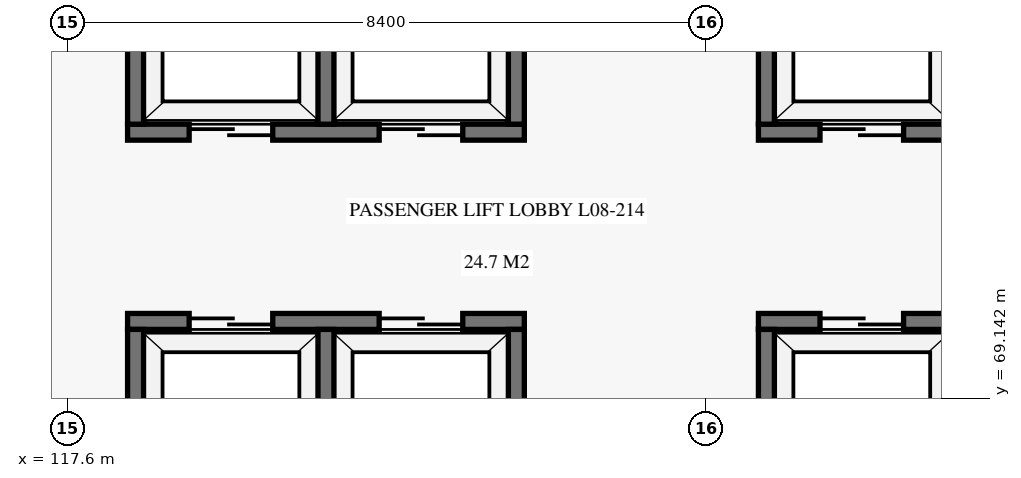
"""IFC4 building model, lengths in metres.
Left out: names, types, materials, properties, quantities, classifications, styles, units other than length and angle.
Written with IfcOpenShell. Run it as: python <this file> out.ifc"""

import sys

from ifc_helpers import new_model, si_unit, direction, frame, frame_2d, origin, place, context, subcontext, project, spatial, rectangle, extrude, element, fill, save


model = new_model("IFC4")
c1 = context("Model", 3, precision=1e-05, world=origin(), true_north=direction((0.0, 1.0)))
c2 = subcontext(c1, "Body", "Model", "MODEL_VIEW")
j1 = project(units=[si_unit("LENGTHUNIT", "METRE"), si_unit("PLANEANGLEUNIT", "RADIAN")], contexts=[c1])
p1 = place(None, origin())
s1 = spatial("IfcSite", under=j1, at=p1, CompositionType="ELEMENT")
p2 = place(p1, origin())
s2 = spatial("IfcBuilding", under=s1, at=p2, CompositionType="ELEMENT")
p3 = place(p2, frame((0.0, 0.0, 34.7)))
s3 = spatial("IfcBuildingStorey", under=s2, at=p3, CompositionType="ELEMENT", Elevation=34.7)
p4 = place(p3, frame((126.69, 70.155, 0.0), z_axis=(0.0, 0.0, 1.0), x_axis=(1.0, 0.0, 0.0)))
e1 = element("IfcWall", 1, at=p4, inside=s3, PredefinedType="SHEAR", context=c2, shape_type="SweptSolid", body=[
    extrude(rectangle(XDim=5.22, YDim=0.21, at=frame_2d((2.61, 0.0))), origin(), (0.0, 0.0, 1.0), 3.72),
])
p5 = place(p4, frame((0.81, 0.0, 0.0)))
e2 = element("IfcOpeningElement", 2, at=p5, cuts=e1, PredefinedType="OPENING", context=c2, shape_type="SweptSolid", body=[
    extrude(rectangle(XDim=1.1, YDim=2.15, at=frame_2d((0.55, 1.075))), frame((0.0, 0.115, 0.0), z_axis=(0.0, -1.0, 0.0), x_axis=(1.0, 0.0, 0.0)), (0.0, 0.0, 1.0), 0.23),
])
p6 = place(p4, frame((3.31, 0.0, 0.0)))
e3 = element("IfcOpeningElement", 3, at=p6, cuts=e1, PredefinedType="OPENING", context=c2, shape_type="SweptSolid", body=[
    extrude(rectangle(XDim=1.1, YDim=2.15, at=frame_2d((0.55, 1.075))), frame((0.0, 0.115, 0.0), z_axis=(0.0, -1.0, 0.0), x_axis=(1.0, 0.0, 0.0)), (0.0, 0.0, 1.0), 0.23),
])
p7 = place(p3, frame((126.795, 67.85, 0.0), z_axis=(0.0, 0.0, 1.0), x_axis=(0.0, 1.0, 0.0)))
e4 = element("IfcWall", 4, at=p7, inside=s3, PredefinedType="SHEAR", context=c2, shape_type="SweptSolid", body=[
    extrude(rectangle(XDim=2.2, YDim=0.21, at=frame_2d((1.1, 0.0))), origin(), (0.0, 0.0, 1.0), 3.72),
])
p8 = place(p3, frame((126.69, 72.645, 0.0), z_axis=(0.0, 0.0, 1.0), x_axis=(1.0, 0.0, 0.0)))
e5 = element("IfcWall", 5, at=p8, inside=s3, PredefinedType="SHEAR", context=c2, shape_type="SweptSolid", body=[
    extrude(rectangle(XDim=5.22, YDim=0.21, at=frame_2d((2.61, 0.0))), origin(), (0.0, 0.0, 1.0), 3.72),
])
p9 = place(p8, frame((0.81, 0.0, 0.0)))
e6 = element("IfcOpeningElement", 6, at=p9, cuts=e5, PredefinedType="OPENING", context=c2, shape_type="SweptSolid", body=[
    extrude(rectangle(XDim=1.1, YDim=2.15, at=frame_2d((0.55, 1.075))), frame((0.0, 0.115, 0.0), z_axis=(0.0, -1.0, 0.0), x_axis=(1.0, 0.0, 0.0)), (0.0, 0.0, 1.0), 0.23),
])
p10 = place(p8, frame((3.31, 0.0, 0.0)))
e7 = element("IfcOpeningElement", 7, at=p10, cuts=e5, PredefinedType="OPENING", context=c2, shape_type="SweptSolid", body=[
    extrude(rectangle(XDim=1.1, YDim=2.15, at=frame_2d((0.55, 1.075))), frame((0.0, 0.115, 0.0), z_axis=(0.0, -1.0, 0.0), x_axis=(1.0, 0.0, 0.0)), (0.0, 0.0, 1.0), 0.23),
])
p11 = place(p3, frame((126.795, 72.75, 0.0), z_axis=(0.0, 0.0, 1.0), x_axis=(0.0, 1.0, 0.0)))
e8 = element("IfcWall", 8, at=p11, inside=s3, PredefinedType="SHEAR", context=c2, shape_type="SweptSolid", body=[
    extrude(rectangle(XDim=2.2, YDim=0.21, at=frame_2d((1.1, 0.0))), origin(), (0.0, 0.0, 1.0), 3.72),
])
p12 = place(p3, frame((118.39, 70.155, 0.0), z_axis=(0.0, 0.0, 1.0), x_axis=(1.0, 0.0, 0.0)))
e9 = element("IfcWall", 9, at=p12, inside=s3, PredefinedType="SHEAR", context=c2, shape_type="SweptSolid", body=[
    extrude(rectangle(XDim=5.22, YDim=0.21, at=frame_2d((2.61, 0.0))), origin(), (0.0, 0.0, 1.0), 3.72),
])
p13 = place(p12, frame((0.81, 0.0, 0.0)))
e10 = element("IfcOpeningElement", 10, at=p13, cuts=e9, PredefinedType="OPENING", context=c2, shape_type="SweptSolid", body=[
    extrude(rectangle(XDim=1.1, YDim=2.15, at=frame_2d((0.55, 1.075))), frame((0.0, 0.115, 0.0), z_axis=(0.0, -1.0, 0.0), x_axis=(1.0, 0.0, 0.0)), (0.0, 0.0, 1.0), 0.23),
])
p14 = place(p12, frame((3.31, 0.0, 0.0)))
e11 = element("IfcOpeningElement", 11, at=p14, cuts=e9, PredefinedType="OPENING", context=c2, shape_type="SweptSolid", body=[
    extrude(rectangle(XDim=1.1, YDim=2.15, at=frame_2d((0.55, 1.075))), frame((0.0, 0.115, 0.0), z_axis=(0.0, -1.0, 0.0), x_axis=(1.0, 0.0, 0.0)), (0.0, 0.0, 1.0), 0.23),
])
for number, where, z_axis, x_axis in (
    (12, (118.495, 67.85, 0.0), (0.0, 0.0, 1.0), (0.0, 1.0, 0.0)),
    (13, (123.505, 67.85, 0.0), (0.0, 0.0, 1.0), (0.0, 1.0, 0.0)),
    (14, (121.0, 67.85, 0.0), (0.0, 0.0, 1.0), (0.0, 1.0, 0.0)),
):
    element("IfcWall", number, at=place(p3, frame(where, z_axis=z_axis, x_axis=x_axis)), inside=s3, PredefinedType="SHEAR", context=c2, shape_type="SweptSolid", body=[
        extrude(rectangle(XDim=2.2, YDim=0.21, at=frame_2d((1.1, 0.0))), origin(), (0.0, 0.0, 1.0), 3.72),
    ])
p15 = place(p3, frame((118.39, 72.645, 0.0), z_axis=(0.0, 0.0, 1.0), x_axis=(1.0, 0.0, 0.0)))
e15 = element("IfcWall", 15, at=p15, inside=s3, PredefinedType="SHEAR", context=c2, shape_type="SweptSolid", body=[
    extrude(rectangle(XDim=5.22, YDim=0.21, at=frame_2d((2.61, 0.0))), origin(), (0.0, 0.0, 1.0), 3.72),
])
p16 = place(p15, frame((0.81, 0.0, 0.0)))
e16 = element("IfcOpeningElement", 16, at=p16, cuts=e15, PredefinedType="OPENING", context=c2, shape_type="SweptSolid", body=[
    extrude(rectangle(XDim=1.1, YDim=2.15, at=frame_2d((0.55, 1.075))), frame((0.0, 0.115, 0.0), z_axis=(0.0, -1.0, 0.0), x_axis=(1.0, 0.0, 0.0)), (0.0, 0.0, 1.0), 0.23),
])
p17 = place(p15, frame((3.31, 0.0, 0.0)))
e17 = element("IfcOpeningElement", 17, at=p17, cuts=e15, PredefinedType="OPENING", context=c2, shape_type="SweptSolid", body=[
    extrude(rectangle(XDim=1.1, YDim=2.15, at=frame_2d((0.55, 1.075))), frame((0.0, 0.115, 0.0), z_axis=(0.0, -1.0, 0.0), x_axis=(1.0, 0.0, 0.0)), (0.0, 0.0, 1.0), 0.23),
])
for number, where, z_axis, x_axis in (
    (18, (118.495, 72.75, 0.0), (0.0, 0.0, 1.0), (0.0, 1.0, 0.0)),
    (19, (123.505, 72.75, 0.0), (0.0, 0.0, 1.0), (0.0, 1.0, 0.0)),
    (20, (121.0, 72.75, 0.0), (0.0, 0.0, 1.0), (0.0, 1.0, 0.0)),
):
    element("IfcWall", number, at=place(p3, frame(where, z_axis=z_axis, x_axis=x_axis)), inside=s3, PredefinedType="SHEAR", context=c2, shape_type="SweptSolid", body=[
        extrude(rectangle(XDim=2.2, YDim=0.21, at=frame_2d((1.1, 0.0))), origin(), (0.0, 0.0, 1.0), 3.72),
    ])
p18 = place(p5, origin())
e21 = element("IfcDoor", 21, at=p18, inside=s3, OperationType="DOUBLE_DOOR_SLIDING", PredefinedType="DOOR", context=c2, shape_type="SweptSolid", body=[
    extrude(rectangle(XDim=1.1, YDim=2.15, at=frame_2d((0.55, 1.075))), frame((0.0, 0.025, 0.0), z_axis=(0.0, -1.0, 0.0), x_axis=(1.0, 0.0, 0.0)), (0.0, 0.0, 1.0), 0.05),
])
fill(e2, e21)
p19 = place(p9, origin())
e22 = element("IfcDoor", 22, at=p19, inside=s3, OperationType="DOUBLE_DOOR_SLIDING", PredefinedType="DOOR", context=c2, shape_type="SweptSolid", body=[
    extrude(rectangle(XDim=1.1, YDim=2.15, at=frame_2d((0.55, 1.075))), frame((0.0, 0.025, 0.0), z_axis=(0.0, -1.0, 0.0), x_axis=(1.0, 0.0, 0.0)), (0.0, 0.0, 1.0), 0.05),
])
fill(e6, e22)
p20 = place(p13, origin())
e23 = element("IfcDoor", 23, at=p20, inside=s3, OperationType="DOUBLE_DOOR_SLIDING", PredefinedType="DOOR", context=c2, shape_type="SweptSolid", body=[
    extrude(rectangle(XDim=1.1, YDim=2.15, at=frame_2d((0.55, 1.075))), frame((0.0, 0.025, 0.0), z_axis=(0.0, -1.0, 0.0), x_axis=(1.0, 0.0, 0.0)), (0.0, 0.0, 1.0), 0.05),
])
fill(e10, e23)
p21 = place(p14, origin())
e24 = element("IfcDoor", 24, at=p21, inside=s3, OperationType="DOUBLE_DOOR_SLIDING", PredefinedType="DOOR", context=c2, shape_type="SweptSolid", body=[
    extrude(rectangle(XDim=1.1, YDim=2.15, at=frame_2d((0.55, 1.075))), frame((0.0, 0.025, 0.0), z_axis=(0.0, -1.0, 0.0), x_axis=(1.0, 0.0, 0.0)), (0.0, 0.0, 1.0), 0.05),
])
fill(e11, e24)
p22 = place(p16, origin())
e25 = element("IfcDoor", 25, at=p22, inside=s3, OperationType="DOUBLE_DOOR_SLIDING", PredefinedType="DOOR", context=c2, shape_type="SweptSolid", body=[
    extrude(rectangle(XDim=1.1, YDim=2.15, at=frame_2d((0.55, 1.075))), frame((0.0, 0.025, 0.0), z_axis=(0.0, -1.0, 0.0), x_axis=(1.0, 0.0, 0.0)), (0.0, 0.0, 1.0), 0.05),
])
fill(e16, e25)
p23 = place(p17, origin())
e26 = element("IfcDoor", 26, at=p23, inside=s3, OperationType="DOUBLE_DOOR_SLIDING", PredefinedType="DOOR", context=c2, shape_type="SweptSolid", body=[
    extrude(rectangle(XDim=1.1, YDim=2.15, at=frame_2d((0.55, 1.075))), frame((0.0, 0.025, 0.0), z_axis=(0.0, -1.0, 0.0), x_axis=(1.0, 0.0, 0.0)), (0.0, 0.0, 1.0), 0.05),
])
fill(e17, e26)
save(model, sys.argv[1])
